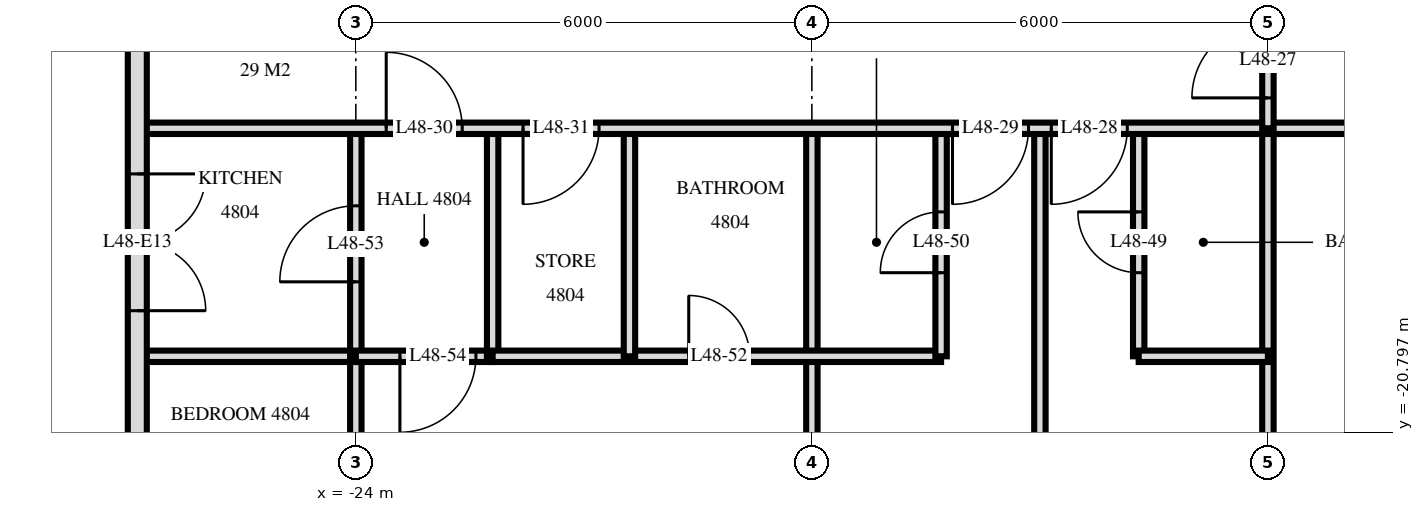
"""IFC4 building model, lengths in metres.
Left out: names, types, materials, properties, quantities, classifications, styles, units other than length and angle.
Written with IfcOpenShell. Run it as: python <this file> out.ifc"""

import sys

from ifc_helpers import new_model, si_unit, direction, frame, frame_2d, origin, place, context, subcontext, project, spatial, rectangle, extrude, element, fill, save


model = new_model("IFC4")
c1 = context("Model", 3, precision=1e-05, world=origin(), true_north=direction((0.0, 1.0)))
c2 = subcontext(c1, "Body", "Model", "MODEL_VIEW")
j1 = project(units=[si_unit("LENGTHUNIT", "METRE"), si_unit("PLANEANGLEUNIT", "RADIAN")], contexts=[c1])
p1 = place(None, origin())
s1 = spatial("IfcSite", under=j1, at=p1, CompositionType="ELEMENT")
p2 = place(p1, origin())
s2 = spatial("IfcBuilding", under=s1, at=p2, CompositionType="ELEMENT")
p3 = place(p2, frame((0.0, 0.0, 187.1)))
s3 = spatial("IfcBuildingStorey", under=s2, at=p3, CompositionType="ELEMENT", Elevation=187.1)
p4 = place(p3, frame((-26.875, -3.325, 0.0), z_axis=(0.0, 0.0, 1.0), x_axis=(0.0, -1.0, 0.0)))
e1 = element("IfcWall", 1, at=p4, inside=s3, PredefinedType="SOLIDWALL", context=c2, shape_type="SweptSolid", body=[
    extrude(rectangle(XDim=21.551, YDim=0.25, at=frame_2d((10.775, 0.0))), origin(), (0.0, 0.0, 1.0), 3.22),
])
p5 = place(p4, frame((7.025, 0.0, 0.0)))
e2 = element("IfcOpeningElement", 2, at=p5, cuts=e1, PredefinedType="OPENING", context=c2, shape_type="SweptSolid", body=[
    extrude(rectangle(XDim=1.8, YDim=2.4, at=frame_2d((0.9, 1.2))), frame((0.0, 0.135, 0.0), z_axis=(0.0, -1.0, 0.0), x_axis=(1.0, 0.0, 0.0)), (0.0, 0.0, 1.0), 0.27),
])
p6 = place(p4, frame((14.075, 0.0, 0.0)))
e3 = element("IfcOpeningElement", 3, at=p6, cuts=e1, PredefinedType="OPENING", context=c2, shape_type="SweptSolid", body=[
    extrude(rectangle(XDim=1.8, YDim=2.4, at=frame_2d((0.9, 1.2))), frame((0.0, 0.135, 0.0), z_axis=(0.0, -1.0, 0.0), x_axis=(1.0, 0.0, 0.0)), (0.0, 0.0, 1.0), 0.27),
])
p7 = place(p4, frame((18.875, 0.0, 0.0)))
e4 = element("IfcOpeningElement", 4, at=p7, cuts=e1, PredefinedType="OPENING", context=c2, shape_type="SweptSolid", body=[
    extrude(rectangle(XDim=1.8, YDim=2.4, at=frame_2d((0.9, 1.2))), frame((0.0, 0.135, 0.0), z_axis=(0.0, -1.0, 0.0), x_axis=(1.0, 0.0, 0.0)), (0.0, 0.0, 1.0), 0.27),
])
p8 = place(p3, frame((-12.0, -16.8, 0.0), z_axis=(0.0, 0.0, 1.0), x_axis=(0.0, 1.0, 0.0)))
e5 = element("IfcWall", 5, at=p8, inside=s3, PredefinedType="PARTITIONING", context=c2, shape_type="SweptSolid", body=[
    extrude(rectangle(XDim=1.75, YDim=0.15, at=frame_2d((0.875, 0.0))), origin(), (0.0, 0.0, 1.0), 3.22),
])
p9 = place(p8, frame((0.4, 0.0, 0.0)))
e6 = element("IfcOpeningElement", 6, at=p9, cuts=e5, PredefinedType="OPENING", context=c2, shape_type="SweptSolid", body=[
    extrude(rectangle(XDim=1.0, YDim=2.1, at=frame_2d((0.5, 1.05))), frame((0.0, 0.085, 0.0), z_axis=(0.0, -1.0, 0.0), x_axis=(1.0, 0.0, 0.0)), (0.0, 0.0, 1.0), 0.17),
])
p10 = place(p3, frame((-12.0, -29.22, 0.0), z_axis=(0.0, 0.0, 1.0), x_axis=(0.0, 1.0, 0.0)))
e7 = element("IfcWall", 7, at=p10, inside=s3, PredefinedType="PARTITIONING", context=c2, shape_type="SweptSolid", body=[
    extrude(rectangle(XDim=12.42, YDim=0.15, at=frame_2d((6.21, 0.0))), origin(), (0.0, 0.0, 1.0), 3.22),
])
p11 = place(p3, frame((-13.7, -19.8, 0.0), z_axis=(0.0, 0.0, 1.0), x_axis=(0.0, 1.0, 0.0)))
e8 = element("IfcWall", 8, at=p11, inside=s3, PredefinedType="PARTITIONING", context=c2, shape_type="SweptSolid", body=[
    extrude(rectangle(XDim=3.0, YDim=0.15, at=frame_2d((1.5, 0.0))), origin(), (0.0, 0.0, 1.0), 3.22),
])
p12 = place(p11, frame((1.1, 0.0, 0.0)))
e9 = element("IfcOpeningElement", 9, at=p12, cuts=e8, PredefinedType="OPENING", context=c2, shape_type="SweptSolid", body=[
    extrude(rectangle(XDim=0.8, YDim=2.1, at=frame_2d((0.4, 1.05))), frame((0.0, 0.085, 0.0), z_axis=(0.0, -1.0, 0.0), x_axis=(1.0, 0.0, 0.0)), (0.0, 0.0, 1.0), 0.17),
])
p13 = place(p3, frame((-15.0, -29.22, 0.0), z_axis=(0.0, 0.0, 1.0), x_axis=(0.0, 1.0, 0.0)))
e10 = element("IfcWall", 10, at=p13, inside=s3, PredefinedType="PARTITIONING", context=c2, shape_type="SweptSolid", body=[
    extrude(rectangle(XDim=12.42, YDim=0.15, at=frame_2d((6.21, 0.0))), origin(), (0.0, 0.0, 1.0), 3.22),
])
p14 = place(p3, frame((-16.3, -19.8, 0.0), z_axis=(0.0, 0.0, 1.0), x_axis=(0.0, 1.0, 0.0)))
e11 = element("IfcWall", 11, at=p14, inside=s3, PredefinedType="PARTITIONING", context=c2, shape_type="SweptSolid", body=[
    extrude(rectangle(XDim=3.0, YDim=0.15, at=frame_2d((1.5, 0.0))), origin(), (0.0, 0.0, 1.0), 3.22),
])
p15 = place(p14, frame((1.1, 0.0, 0.0)))
e12 = element("IfcOpeningElement", 12, at=p15, cuts=e11, PredefinedType="OPENING", context=c2, shape_type="SweptSolid", body=[
    extrude(rectangle(XDim=0.8, YDim=2.1, at=frame_2d((0.4, 1.05))), frame((0.0, 0.085, 0.0), z_axis=(0.0, -1.0, 0.0), x_axis=(1.0, 0.0, 0.0)), (0.0, 0.0, 1.0), 0.17),
])
p16 = place(p3, frame((-18.0, -29.22, 0.0), z_axis=(0.0, 0.0, 1.0), x_axis=(0.0, 1.0, 0.0)))
e13 = element("IfcWall", 13, at=p16, inside=s3, PredefinedType="PARTITIONING", context=c2, shape_type="SweptSolid", body=[
    extrude(rectangle(XDim=12.42, YDim=0.15, at=frame_2d((6.21, 0.0))), origin(), (0.0, 0.0, 1.0), 3.22),
])
for number, where, z_axis, x_axis in (
    (14, (-20.4, -19.8, 0.0), (0.0, 0.0, 1.0), (0.0, 1.0, 0.0)),
    (15, (-22.2, -19.8, 0.0), (0.0, 0.0, 1.0), (0.0, 1.0, 0.0)),
):
    element("IfcWall", number, at=place(p3, frame(where, z_axis=z_axis, x_axis=x_axis)), inside=s3, PredefinedType="PARTITIONING", context=c2, shape_type="SweptSolid", body=[
        extrude(rectangle(XDim=3.0, YDim=0.15, at=frame_2d((1.5, 0.0))), origin(), (0.0, 0.0, 1.0), 3.22),
    ])
p17 = place(p3, frame((-24.0, -19.8, 0.0), z_axis=(0.0, 0.0, 1.0), x_axis=(0.0, 1.0, 0.0)))
e16 = element("IfcWall", 16, at=p17, inside=s3, PredefinedType="PARTITIONING", context=c2, shape_type="SweptSolid", body=[
    extrude(rectangle(XDim=3.0, YDim=0.15, at=frame_2d((1.5, 0.0))), origin(), (0.0, 0.0, 1.0), 3.22),
])
p18 = place(p17, frame((0.98, 0.0, 0.0)))
e17 = element("IfcOpeningElement", 17, at=p18, cuts=e16, PredefinedType="OPENING", context=c2, shape_type="SweptSolid", body=[
    extrude(rectangle(XDim=1.0, YDim=2.1, at=frame_2d((0.5, 1.05))), frame((0.0, 0.085, 0.0), z_axis=(0.0, -1.0, 0.0), x_axis=(1.0, 0.0, 0.0)), (0.0, 0.0, 1.0), 0.17),
])
p19 = place(p3, frame((-24.0, -28.918, 0.0), z_axis=(0.0, 0.0, 1.0), x_axis=(0.0, 1.0, 0.0)))
e18 = element("IfcWall", 18, at=p19, inside=s3, PredefinedType="PARTITIONING", context=c2, shape_type="SweptSolid", body=[
    extrude(rectangle(XDim=9.118, YDim=0.15, at=frame_2d((4.559, 0.0))), origin(), (0.0, 0.0, 1.0), 3.22),
])
p20 = place(p19, frame((4.036, 0.0, 0.0)))
e19 = element("IfcOpeningElement", 19, at=p20, cuts=e18, PredefinedType="OPENING", context=c2, shape_type="SweptSolid", body=[
    extrude(rectangle(XDim=0.9, YDim=2.1, at=frame_2d((0.45, 1.05))), frame((0.0, 0.085, 0.0), z_axis=(0.0, -1.0, 0.0), x_axis=(1.0, 0.0, 0.0)), (0.0, 0.0, 1.0), 0.17),
])
p21 = place(p3, frame((-24.0, -19.8, 0.0), z_axis=(0.0, 0.0, 1.0), x_axis=(1.0, 0.0, 0.0)))
e20 = element("IfcWall", 20, at=p21, inside=s3, PredefinedType="PARTITIONING", context=c2, shape_type="SweptSolid", body=[
    extrude(rectangle(XDim=1.8, YDim=0.15, at=frame_2d((0.9, 0.0))), origin(), (0.0, 0.0, 1.0), 3.22),
])
p22 = place(p21, frame((0.58, 0.0, 0.0)))
e21 = element("IfcOpeningElement", 21, at=p22, cuts=e20, PredefinedType="OPENING", context=c2, shape_type="SweptSolid", body=[
    extrude(rectangle(XDim=1.0, YDim=2.1, at=frame_2d((0.5, 1.05))), frame((0.0, 0.085, 0.0), z_axis=(0.0, -1.0, 0.0), x_axis=(1.0, 0.0, 0.0)), (0.0, 0.0, 1.0), 0.17),
])
p23 = place(p3, frame((-26.82, -19.8, 0.0), z_axis=(0.0, 0.0, 1.0), x_axis=(1.0, 0.0, 0.0)))
e22 = element("IfcWall", 22, at=p23, inside=s3, PredefinedType="PARTITIONING", context=c2, shape_type="SweptSolid", body=[
    extrude(rectangle(XDim=2.82, YDim=0.15, at=frame_2d((1.41, 0.0))), origin(), (0.0, 0.0, 1.0), 3.22),
])
p24 = place(p3, frame((-22.2, -19.8, 0.0), z_axis=(0.0, 0.0, 1.0), x_axis=(1.0, 0.0, 0.0)))
e23 = element("IfcWall", 23, at=p24, inside=s3, PredefinedType="PARTITIONING", context=c2, shape_type="SweptSolid", body=[
    extrude(rectangle(XDim=5.9, YDim=0.15, at=frame_2d((2.95, 0.0))), origin(), (0.0, 0.0, 1.0), 3.22),
])
p25 = place(p24, frame((2.58, 0.0, 0.0)))
e24 = element("IfcOpeningElement", 24, at=p25, cuts=e23, PredefinedType="OPENING", context=c2, shape_type="SweptSolid", body=[
    extrude(rectangle(XDim=0.8, YDim=2.1, at=frame_2d((0.4, 1.05))), frame((0.0, 0.085, 0.0), z_axis=(0.0, -1.0, 0.0), x_axis=(1.0, 0.0, 0.0)), (0.0, 0.0, 1.0), 0.17),
])
p26 = place(p3, frame((-13.7, -19.8, 0.0), z_axis=(0.0, 0.0, 1.0), x_axis=(1.0, 0.0, 0.0)))
e25 = element("IfcWall", 25, at=p26, inside=s3, PredefinedType="PARTITIONING", context=c2, shape_type="SweptSolid", body=[
    extrude(rectangle(XDim=1.7, YDim=0.15, at=frame_2d((0.85, 0.0))), origin(), (0.0, 0.0, 1.0), 3.22),
])
p27 = place(p3, frame((-26.82, -16.8, 0.0), z_axis=(0.0, 0.0, 1.0), x_axis=(1.0, 0.0, 0.0)))
e26 = element("IfcWall", 26, at=p27, inside=s3, PredefinedType="PARTITIONING", context=c2, shape_type="SweptSolid", body=[
    extrude(rectangle(XDim=53.64, YDim=0.15, at=frame_2d((26.82, 0.0))), origin(), (0.0, 0.0, 1.0), 3.22),
])
p28 = place(p27, frame((11.97, 0.0, 0.0)))
e27 = element("IfcOpeningElement", 27, at=p28, cuts=e26, PredefinedType="OPENING", context=c2, shape_type="SweptSolid", body=[
    extrude(rectangle(XDim=1.0, YDim=2.1, at=frame_2d((0.5, 1.05))), frame((0.0, 0.085, 0.0), z_axis=(0.0, -1.0, 0.0), x_axis=(1.0, 0.0, 0.0)), (0.0, 0.0, 1.0), 0.17),
])
p29 = place(p27, frame((10.67, 0.0, 0.0)))
e28 = element("IfcOpeningElement", 28, at=p29, cuts=e26, PredefinedType="OPENING", context=c2, shape_type="SweptSolid", body=[
    extrude(rectangle(XDim=1.0, YDim=2.1, at=frame_2d((0.5, 1.05))), frame((0.0, 0.085, 0.0), z_axis=(0.0, -1.0, 0.0), x_axis=(1.0, 0.0, 0.0)), (0.0, 0.0, 1.0), 0.17),
])
p30 = place(p27, frame((3.22, 0.0, 0.0)))
e29 = element("IfcOpeningElement", 29, at=p30, cuts=e26, PredefinedType="OPENING", context=c2, shape_type="SweptSolid", body=[
    extrude(rectangle(XDim=1.0, YDim=2.1, at=frame_2d((0.5, 1.05))), frame((0.0, 0.085, 0.0), z_axis=(0.0, -1.0, 0.0), x_axis=(1.0, 0.0, 0.0)), (0.0, 0.0, 1.0), 0.17),
])
p31 = place(p27, frame((5.02, 0.0, 0.0)))
e30 = element("IfcOpeningElement", 30, at=p31, cuts=e26, PredefinedType="OPENING", context=c2, shape_type="SweptSolid", body=[
    extrude(rectangle(XDim=1.0, YDim=2.1, at=frame_2d((0.5, 1.05))), frame((0.0, 0.085, 0.0), z_axis=(0.0, -1.0, 0.0), x_axis=(1.0, 0.0, 0.0)), (0.0, 0.0, 1.0), 0.17),
])
p32 = place(p27, frame((38.97, 0.0, 0.0)))
e31 = element("IfcOpeningElement", 31, at=p32, cuts=e26, PredefinedType="OPENING", context=c2, shape_type="SweptSolid", body=[
    extrude(rectangle(XDim=1.0, YDim=2.1, at=frame_2d((0.5, 1.05))), frame((0.0, 0.085, 0.0), z_axis=(0.0, -1.0, 0.0), x_axis=(1.0, 0.0, 0.0)), (0.0, 0.0, 1.0), 0.17),
])
p33 = place(p27, frame((48.72, 0.0, 0.0)))
e32 = element("IfcOpeningElement", 32, at=p33, cuts=e26, PredefinedType="OPENING", context=c2, shape_type="SweptSolid", body=[
    extrude(rectangle(XDim=1.0, YDim=2.1, at=frame_2d((0.5, 1.05))), frame((0.0, 0.085, 0.0), z_axis=(0.0, -1.0, 0.0), x_axis=(1.0, 0.0, 0.0)), (0.0, 0.0, 1.0), 0.17),
])
p34 = place(p27, frame((46.92, 0.0, 0.0)))
e33 = element("IfcOpeningElement", 33, at=p34, cuts=e26, PredefinedType="OPENING", context=c2, shape_type="SweptSolid", body=[
    extrude(rectangle(XDim=1.0, YDim=2.1, at=frame_2d((0.5, 1.05))), frame((0.0, 0.085, 0.0), z_axis=(0.0, -1.0, 0.0), x_axis=(1.0, 0.0, 0.0)), (0.0, 0.0, 1.0), 0.17),
])
p35 = place(p27, frame((18.32, 0.0, 0.0)))
e34 = element("IfcOpeningElement", 34, at=p35, cuts=e26, PredefinedType="OPENING", context=c2, shape_type="SweptSolid", body=[
    extrude(rectangle(XDim=1.0, YDim=2.1, at=frame_2d((0.5, 1.05))), frame((0.0, 0.085, 0.0), z_axis=(0.0, -1.0, 0.0), x_axis=(1.0, 0.0, 0.0)), (0.0, 0.0, 1.0), 0.17),
])
p36 = place(p27, frame((26.32, 0.0, 0.0)))
e35 = element("IfcOpeningElement", 35, at=p36, cuts=e26, PredefinedType="OPENING", context=c2, shape_type="SweptSolid", body=[
    extrude(rectangle(XDim=1.0, YDim=2.1, at=frame_2d((0.5, 1.05))), frame((0.0, 0.085, 0.0), z_axis=(0.0, -1.0, 0.0), x_axis=(1.0, 0.0, 0.0)), (0.0, 0.0, 1.0), 0.17),
])
p37 = place(p27, frame((34.32, 0.0, 0.0)))
e36 = element("IfcOpeningElement", 36, at=p37, cuts=e26, PredefinedType="OPENING", context=c2, shape_type="SweptSolid", body=[
    extrude(rectangle(XDim=1.0, YDim=2.1, at=frame_2d((0.5, 1.05))), frame((0.0, 0.085, 0.0), z_axis=(0.0, -1.0, 0.0), x_axis=(1.0, 0.0, 0.0)), (0.0, 0.0, 1.0), 0.17),
])
p38 = place(p6, origin())
e37 = element("IfcDoor", 37, at=p38, inside=s3, OperationType="DOUBLE_DOOR_SINGLE_SWING", PredefinedType="DOOR", context=c2, shape_type="SweptSolid", body=[
    extrude(rectangle(XDim=1.8, YDim=2.4, at=frame_2d((0.9, 1.2))), frame((0.0, 0.025, 0.0), z_axis=(0.0, -1.0, 0.0), x_axis=(1.0, 0.0, 0.0)), (0.0, 0.0, 1.0), 0.05),
])
fill(e3, e37)
p39 = place(p9, origin())
e38 = element("IfcDoor", 38, at=p39, inside=s3, OperationType="SINGLE_SWING_RIGHT", PredefinedType="DOOR", context=c2, shape_type="SweptSolid", body=[
    extrude(rectangle(XDim=1.0, YDim=2.1, at=frame_2d((0.5, 1.05))), frame((0.0, 0.025, 0.0), z_axis=(0.0, -1.0, 0.0), x_axis=(1.0, 0.0, 0.0)), (0.0, 0.0, 1.0), 0.05),
])
fill(e6, e38)
p40 = place(p28, frame((0.5, 0.0, 0.0), z_axis=(0.0, 0.0, 1.0), x_axis=(-1.0, 0.0, 0.0)))
e39 = element("IfcDoor", 39, at=p40, inside=s3, OperationType="SINGLE_SWING_LEFT", PredefinedType="DOOR", context=c2, shape_type="SweptSolid", body=[
    extrude(rectangle(XDim=1.0, YDim=2.1, at=frame_2d((0.0, 1.05))), frame((0.0, -0.025, 0.0), z_axis=(0.0, 1.0, 0.0), x_axis=(-1.0, 0.0, 0.0)), (0.0, 0.0, 1.0), 0.05),
])
fill(e27, e39)
p41 = place(p29, frame((0.5, 0.0, 0.0), z_axis=(0.0, 0.0, 1.0), x_axis=(-1.0, 0.0, 0.0)))
e40 = element("IfcDoor", 40, at=p41, inside=s3, OperationType="SINGLE_SWING_LEFT", PredefinedType="DOOR", context=c2, shape_type="SweptSolid", body=[
    extrude(rectangle(XDim=1.0, YDim=2.1, at=frame_2d((0.0, 1.05))), frame((0.0, -0.025, 0.0), z_axis=(0.0, 1.0, 0.0), x_axis=(-1.0, 0.0, 0.0)), (0.0, 0.0, 1.0), 0.05),
])
fill(e28, e40)
p42 = place(p30, origin())
e41 = element("IfcDoor", 41, at=p42, inside=s3, OperationType="SINGLE_SWING_RIGHT", PredefinedType="DOOR", context=c2, shape_type="SweptSolid", body=[
    extrude(rectangle(XDim=1.0, YDim=2.1, at=frame_2d((0.5, 1.05))), frame((0.0, 0.025, 0.0), z_axis=(0.0, -1.0, 0.0), x_axis=(1.0, 0.0, 0.0)), (0.0, 0.0, 1.0), 0.05),
])
fill(e29, e41)
p43 = place(p31, frame((0.5, 0.0, 0.0), z_axis=(0.0, 0.0, 1.0), x_axis=(-1.0, 0.0, 0.0)))
e42 = element("IfcDoor", 42, at=p43, inside=s3, OperationType="SINGLE_SWING_LEFT", PredefinedType="DOOR", context=c2, shape_type="SweptSolid", body=[
    extrude(rectangle(XDim=1.0, YDim=2.1, at=frame_2d((0.0, 1.05))), frame((0.0, -0.025, 0.0), z_axis=(0.0, 1.0, 0.0), x_axis=(-1.0, 0.0, 0.0)), (0.0, 0.0, 1.0), 0.05),
])
fill(e30, e42)
p44 = place(p12, origin())
e43 = element("IfcDoor", 43, at=p44, inside=s3, OperationType="SINGLE_SWING_LEFT", PredefinedType="DOOR", context=c2, shape_type="SweptSolid", body=[
    extrude(rectangle(XDim=0.8, YDim=2.1, at=frame_2d((0.4, 1.05))), frame((0.0, 0.025, 0.0), z_axis=(0.0, -1.0, 0.0), x_axis=(1.0, 0.0, 0.0)), (0.0, 0.0, 1.0), 0.05),
])
fill(e9, e43)
p45 = place(p15, origin())
e44 = element("IfcDoor", 44, at=p45, inside=s3, OperationType="SINGLE_SWING_RIGHT", PredefinedType="DOOR", context=c2, shape_type="SweptSolid", body=[
    extrude(rectangle(XDim=0.8, YDim=2.1, at=frame_2d((0.4, 1.05))), frame((0.0, 0.025, 0.0), z_axis=(0.0, -1.0, 0.0), x_axis=(1.0, 0.0, 0.0)), (0.0, 0.0, 1.0), 0.05),
])
fill(e12, e44)
p46 = place(p25, origin())
e45 = element("IfcDoor", 45, at=p46, inside=s3, OperationType="SINGLE_SWING_RIGHT", PredefinedType="DOOR", context=c2, shape_type="SweptSolid", body=[
    extrude(rectangle(XDim=0.8, YDim=2.1, at=frame_2d((0.4, 1.05))), frame((0.0, 0.025, 0.0), z_axis=(0.0, -1.0, 0.0), x_axis=(1.0, 0.0, 0.0)), (0.0, 0.0, 1.0), 0.05),
])
fill(e24, e45)
p47 = place(p18, origin())
e46 = element("IfcDoor", 46, at=p47, inside=s3, OperationType="SINGLE_SWING_RIGHT", PredefinedType="DOOR", context=c2, shape_type="SweptSolid", body=[
    extrude(rectangle(XDim=1.0, YDim=2.1, at=frame_2d((0.5, 1.05))), frame((0.0, 0.025, 0.0), z_axis=(0.0, -1.0, 0.0), x_axis=(1.0, 0.0, 0.0)), (0.0, 0.0, 1.0), 0.05),
])
fill(e17, e46)
p48 = place(p22, frame((0.5, 0.0, 0.0), z_axis=(0.0, 0.0, 1.0), x_axis=(-1.0, 0.0, 0.0)))
e47 = element("IfcDoor", 47, at=p48, inside=s3, OperationType="SINGLE_SWING_LEFT", PredefinedType="DOOR", context=c2, shape_type="SweptSolid", body=[
    extrude(rectangle(XDim=1.0, YDim=2.1, at=frame_2d((0.0, 1.05))), frame((0.0, -0.025, 0.0), z_axis=(0.0, 1.0, 0.0), x_axis=(-1.0, 0.0, 0.0)), (0.0, 0.0, 1.0), 0.05),
])
fill(e21, e47)
save(model, sys.argv[1])
